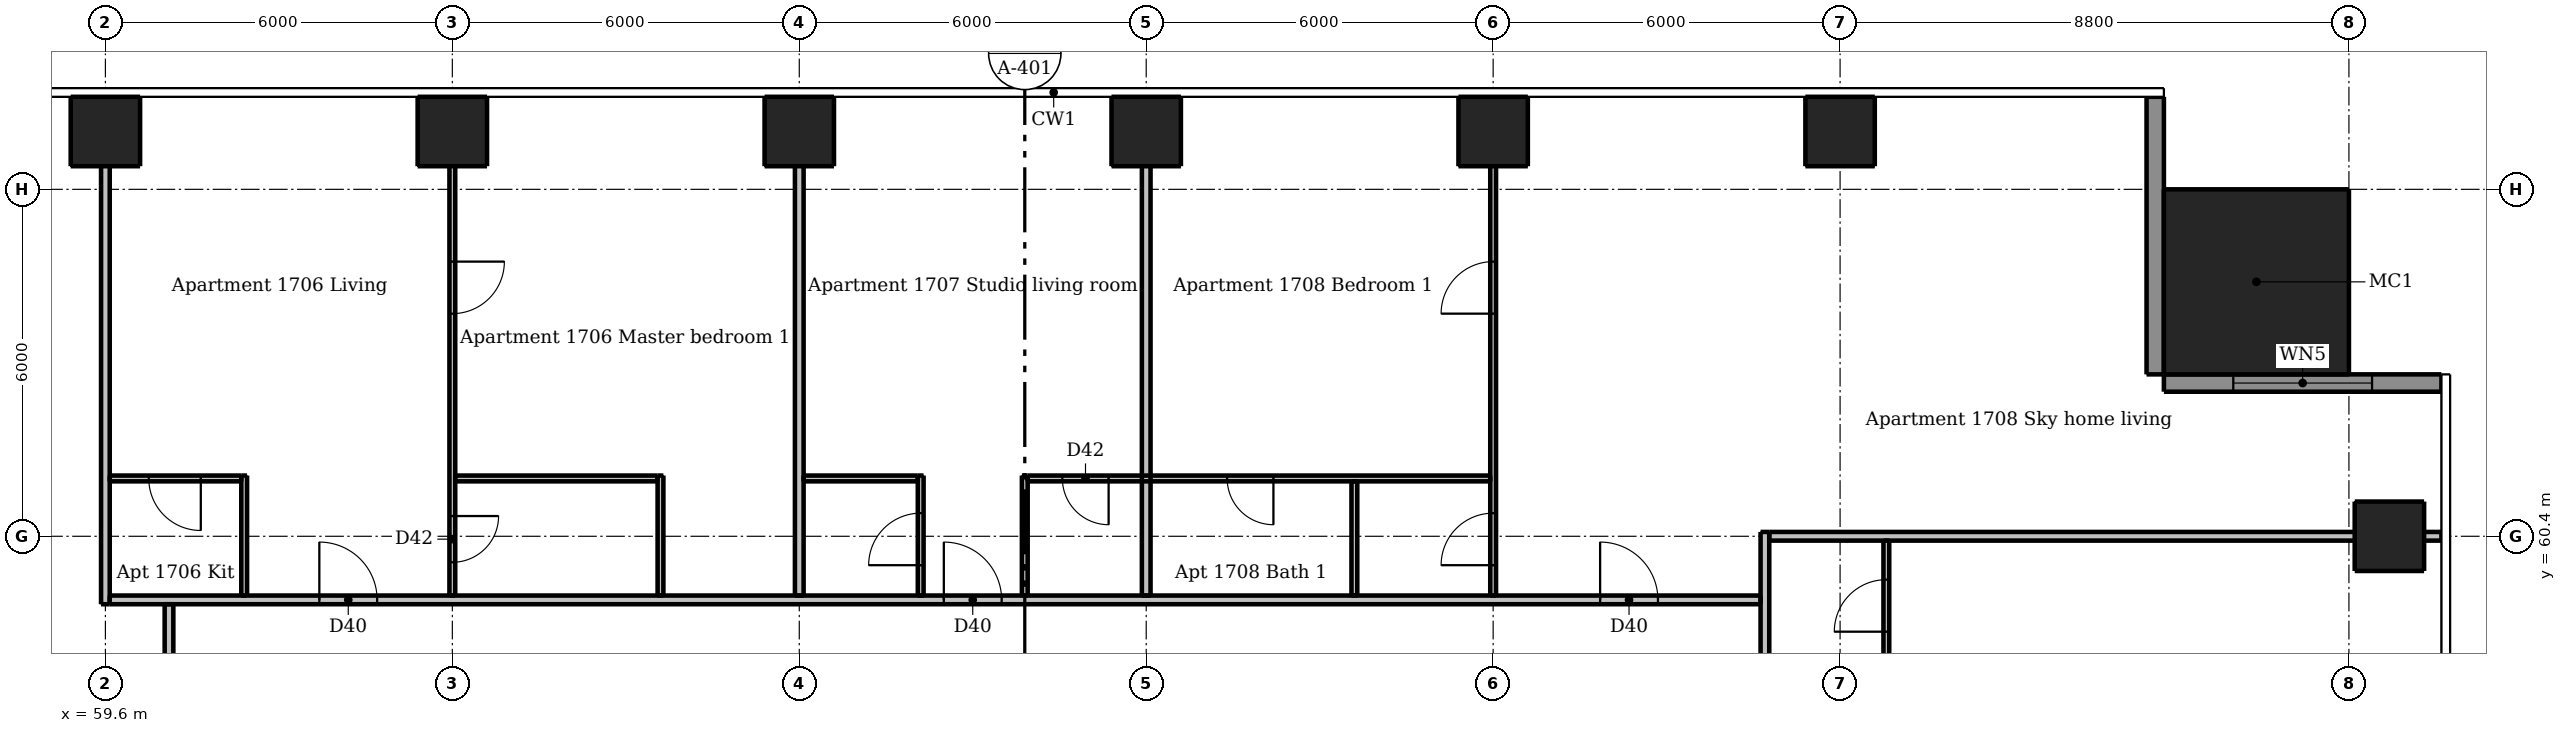
"""IFC4 building model, lengths in metres.
Left out: names, types, materials, properties, quantities, classifications, styles, units other than length and angle.
Written with IfcOpenShell. Run it as: python <this file> out.ifc"""

import sys

from ifc_helpers import new_model, si_unit, direction, frame, frame_2d, origin, origin_2d, place, context, subcontext, project, spatial, rectangle, extrude, element, fill, save


model = new_model("IFC4")
c1 = context("Model", 3, precision=1e-05, world=origin(), true_north=direction((0.0, 1.0)))
c2 = subcontext(c1, "Body", "Model", "MODEL_VIEW")
j1 = project(units=[si_unit("LENGTHUNIT", "METRE"), si_unit("PLANEANGLEUNIT", "RADIAN")], contexts=[c1])
p1 = place(None, origin())
s1 = spatial("IfcSite", under=j1, at=p1, CompositionType="ELEMENT")
p2 = place(p1, origin())
s2 = spatial("IfcBuilding", under=s1, at=p2, CompositionType="ELEMENT")
p3 = place(p2, frame((0.0, 0.0, 63.1)))
s3 = spatial("IfcBuildingStorey", under=s2, at=p3, CompositionType="ELEMENT", Elevation=63.1)
for number, where, z_axis, x_axis in (
    (1, (99.1, 60.4, 0.0), (0.0, 0.0, 1.0), (1.0, 0.0, 0.0)),
    (2, (59.6, 67.4, 0.0), (0.0, 0.0, 1.0), (1.0, 0.0, 0.0)),
    (3, (65.6, 67.4, 0.0), (0.0, 0.0, 1.0), (1.0, 0.0, 0.0)),
    (4, (71.6, 67.4, 0.0), (0.0, 0.0, 1.0), (1.0, 0.0, 0.0)),
    (5, (77.6, 67.4, 0.0), (0.0, 0.0, 1.0), (1.0, 0.0, 0.0)),
    (6, (83.6, 67.4, 0.0), (0.0, 0.0, 1.0), (1.0, 0.0, 0.0)),
    (7, (89.6, 67.4, 0.0), (0.0, 0.0, 1.0), (1.0, 0.0, 0.0)),
):
    element("IfcColumn", number, at=place(p3, frame(where, z_axis=z_axis, x_axis=x_axis)), inside=s3, PredefinedType="COLUMN", context=c2, shape_type="SweptSolid", body=[
        extrude(rectangle(XDim=1.2, YDim=1.2, at=origin_2d()), origin(), (0.0, 0.0, 1.0), 3.05),
    ])
p4 = place(p3, frame((96.8, 64.8, 0.0), z_axis=(0.0, 0.0, 1.0), x_axis=(1.0, 0.0, 0.0)))
e8 = element("IfcColumn", 8, at=p4, inside=s3, PredefinedType="COLUMN", context=c2, shape_type="SweptSolid", body=[
    extrude(rectangle(XDim=3.2, YDim=3.2, at=origin_2d()), origin(), (0.0, 0.0, 1.0), 3.3),
])
p5 = place(p3, frame((100.0, 63.05, 0.0), z_axis=(0.0, 0.0, 1.0), x_axis=(-1.0, 0.0, 0.0)))
e9 = element("IfcWall", 9, at=p5, inside=s3, PredefinedType="SOLIDWALL", context=c2, shape_type="SweptSolid", body=[
    extrude(rectangle(XDim=4.8, YDim=0.3, at=frame_2d((2.4, 0.0))), origin(), (0.0, 0.0, 1.0), 3.05),
])
p6 = place(p5, frame((1.2, 0.0, 0.15)))
e10 = element("IfcOpeningElement", 10, at=p6, cuts=e9, PredefinedType="OPENING", context=c2, shape_type="SweptSolid", body=[
    extrude(rectangle(XDim=2.4, YDim=2.1, at=frame_2d((1.2, 1.05))), frame((0.0, 0.16, 0.0), z_axis=(0.0, -1.0, 0.0), x_axis=(1.0, 0.0, 0.0)), (0.0, 0.0, 1.0), 0.32),
])
p7 = place(p3, frame((95.05, 63.2, 0.0), z_axis=(0.0, 0.0, 1.0), x_axis=(0.0, 1.0, 0.0)))
e11 = element("IfcWall", 11, at=p7, inside=s3, PredefinedType="SOLIDWALL", context=c2, shape_type="SweptSolid", body=[
    extrude(rectangle(XDim=4.8, YDim=0.3, at=frame_2d((2.4, 0.0))), origin(), (0.0, 0.0, 1.0), 3.05),
])
p8 = place(p3, frame((62.0, 59.375, 0.0), z_axis=(0.0, 0.0, 1.0), x_axis=(0.0, 1.0, 0.0)))
e12 = element("IfcWall", 12, at=p8, inside=s3, PredefinedType="PARTITIONING", context=c2, shape_type="SweptSolid", body=[
    extrude(rectangle(XDim=2.075, YDim=0.1, at=frame_2d((1.038, 0.0))), origin(), (0.0, 0.0, 1.0), 3.05),
])
p9 = place(p3, frame((65.6, 68.0, 0.0), z_axis=(0.0, 0.0, 1.0), x_axis=(0.0, -1.0, 0.0)))
e13 = element("IfcWall", 13, at=p9, inside=s3, PredefinedType="PARTITIONING", context=c2, shape_type="SweptSolid", body=[
    extrude(rectangle(XDim=8.625, YDim=0.1, at=frame_2d((4.312, 0.0))), origin(), (0.0, 0.0, 1.0), 2.516),
])
p10 = place(p9, frame((2.85, 0.0, 0.0)))
e14 = element("IfcOpeningElement", 14, at=p10, cuts=e13, PredefinedType="OPENING", context=c2, shape_type="SweptSolid", body=[
    extrude(rectangle(XDim=0.9, YDim=2.1, at=frame_2d((0.45, 1.05))), frame((0.0, 0.06, 0.0), z_axis=(0.0, -1.0, 0.0), x_axis=(1.0, 0.0, 0.0)), (0.0, 0.0, 1.0), 0.12),
])
p11 = place(p9, frame((7.25, 0.0, 0.0)))
e15 = element("IfcOpeningElement", 15, at=p11, cuts=e13, PredefinedType="OPENING", context=c2, shape_type="SweptSolid", body=[
    extrude(rectangle(XDim=0.8, YDim=2.1, at=frame_2d((0.4, 1.05))), frame((0.0, 0.06, 0.0), z_axis=(0.0, -1.0, 0.0), x_axis=(1.0, 0.0, 0.0)), (0.0, 0.0, 1.0), 0.12),
])
p12 = place(p3, frame((69.2, 59.375, 0.0), z_axis=(0.0, 0.0, 1.0), x_axis=(0.0, 1.0, 0.0)))
e16 = element("IfcWall", 16, at=p12, inside=s3, PredefinedType="PARTITIONING", context=c2, shape_type="SweptSolid", body=[
    extrude(rectangle(XDim=2.075, YDim=0.1, at=frame_2d((1.038, 0.0))), origin(), (0.0, 0.0, 1.0), 3.05),
])
p13 = place(p3, frame((73.7, 59.375, 0.0), z_axis=(0.0, 0.0, 1.0), x_axis=(0.0, 1.0, 0.0)))
e17 = element("IfcWall", 17, at=p13, inside=s3, PredefinedType="PARTITIONING", context=c2, shape_type="SweptSolid", body=[
    extrude(rectangle(XDim=2.075, YDim=0.1, at=frame_2d((1.038, 0.0))), origin(), (0.0, 0.0, 1.0), 3.05),
])
p14 = place(p13, frame((0.525, 0.0, 0.0)))
e18 = element("IfcOpeningElement", 18, at=p14, cuts=e17, PredefinedType="OPENING", context=c2, shape_type="SweptSolid", body=[
    extrude(rectangle(XDim=0.9, YDim=2.1, at=frame_2d((0.45, 1.05))), frame((0.0, 0.06, 0.0), z_axis=(0.0, -1.0, 0.0), x_axis=(1.0, 0.0, 0.0)), (0.0, 0.0, 1.0), 0.12),
])
p15 = place(p3, frame((75.5, 59.375, 0.0), z_axis=(0.0, 0.0, 1.0), x_axis=(0.0, 1.0, 0.0)))
e19 = element("IfcWall", 19, at=p15, inside=s3, PredefinedType="PARTITIONING", context=c2, shape_type="SweptSolid", body=[
    extrude(rectangle(XDim=2.075, YDim=0.1, at=frame_2d((1.038, 0.0))), origin(), (0.0, 0.0, 1.0), 3.05),
])
p16 = place(p3, frame((81.2, 59.375, 0.0), z_axis=(0.0, 0.0, 1.0), x_axis=(0.0, 1.0, 0.0)))
e20 = element("IfcWall", 20, at=p16, inside=s3, PredefinedType="PARTITIONING", context=c2, shape_type="SweptSolid", body=[
    extrude(rectangle(XDim=1.975, YDim=0.1, at=frame_2d((0.988, 0.0))), origin(), (0.0, 0.0, 1.0), 3.05),
])
p17 = place(p3, frame((83.6, 59.375, 0.0), z_axis=(0.0, 0.0, 1.0), x_axis=(0.0, 1.0, 0.0)))
e21 = element("IfcWall", 21, at=p17, inside=s3, PredefinedType="PARTITIONING", context=c2, shape_type="SweptSolid", body=[
    extrude(rectangle(XDim=8.625, YDim=0.1, at=frame_2d((4.312, 0.0))), origin(), (0.0, 0.0, 1.0), 2.516),
])
p18 = place(p17, frame((0.525, 0.0, 0.0)))
e22 = element("IfcOpeningElement", 22, at=p18, cuts=e21, PredefinedType="OPENING", context=c2, shape_type="SweptSolid", body=[
    extrude(rectangle(XDim=0.9, YDim=2.1, at=frame_2d((0.45, 1.05))), frame((0.0, 0.06, 0.0), z_axis=(0.0, -1.0, 0.0), x_axis=(1.0, 0.0, 0.0)), (0.0, 0.0, 1.0), 0.12),
])
p19 = place(p17, frame((4.875, 0.0, 0.0)))
e23 = element("IfcOpeningElement", 23, at=p19, cuts=e21, PredefinedType="OPENING", context=c2, shape_type="SweptSolid", body=[
    extrude(rectangle(XDim=0.9, YDim=2.1, at=frame_2d((0.45, 1.05))), frame((0.0, 0.06, 0.0), z_axis=(0.0, -1.0, 0.0), x_axis=(1.0, 0.0, 0.0)), (0.0, 0.0, 1.0), 0.12),
])
p20 = place(p3, frame((90.4, 57.95, 0.0), z_axis=(0.0, 0.0, 1.0), x_axis=(0.0, 1.0, 0.0)))
e24 = element("IfcWall", 24, at=p20, inside=s3, PredefinedType="PARTITIONING", context=c2, shape_type="SweptSolid", body=[
    extrude(rectangle(XDim=2.375, YDim=0.1, at=frame_2d((1.188, 0.0))), origin(), (0.0, 0.0, 1.0), 3.05),
])
p21 = place(p20, frame((0.8, 0.0, 0.0)))
e25 = element("IfcOpeningElement", 25, at=p21, cuts=e24, PredefinedType="OPENING", context=c2, shape_type="SweptSolid", body=[
    extrude(rectangle(XDim=0.9, YDim=2.1, at=frame_2d((0.45, 1.05))), frame((0.0, 0.06, 0.0), z_axis=(0.0, -1.0, 0.0), x_axis=(1.0, 0.0, 0.0)), (0.0, 0.0, 1.0), 0.12),
])
p22 = place(p3, frame((61.95, 61.4, 0.0), z_axis=(0.0, 0.0, 1.0), x_axis=(-1.0, 0.0, 0.0)))
e26 = element("IfcWall", 26, at=p22, inside=s3, PredefinedType="PARTITIONING", context=c2, shape_type="SweptSolid", body=[
    extrude(rectangle(XDim=2.275, YDim=0.1, at=frame_2d((1.137, 0.0))), origin(), (0.0, 0.0, 1.0), 3.05),
])
p23 = place(p22, frame((0.7, 0.0, 0.0)))
e27 = element("IfcOpeningElement", 27, at=p23, cuts=e26, PredefinedType="OPENING", context=c2, shape_type="SweptSolid", body=[
    extrude(rectangle(XDim=0.9, YDim=2.1, at=frame_2d((0.45, 1.05))), frame((0.0, 0.06, 0.0), z_axis=(0.0, -1.0, 0.0), x_axis=(1.0, 0.0, 0.0)), (0.0, 0.0, 1.0), 0.12),
])
p24 = place(p3, frame((65.65, 61.4, 0.0), z_axis=(0.0, 0.0, 1.0), x_axis=(1.0, 0.0, 0.0)))
e28 = element("IfcWall", 28, at=p24, inside=s3, PredefinedType="PARTITIONING", context=c2, shape_type="SweptSolid", body=[
    extrude(rectangle(XDim=3.5, YDim=0.1, at=frame_2d((1.75, 0.0))), origin(), (0.0, 0.0, 1.0), 3.05),
])
p25 = place(p3, frame((71.675, 61.4, 0.0), z_axis=(0.0, 0.0, 1.0), x_axis=(1.0, 0.0, 0.0)))
e29 = element("IfcWall", 29, at=p25, inside=s3, PredefinedType="PARTITIONING", context=c2, shape_type="SweptSolid", body=[
    extrude(rectangle(XDim=1.975, YDim=0.1, at=frame_2d((0.987, 0.0))), origin(), (0.0, 0.0, 1.0), 3.05),
])
p26 = place(p3, frame((83.55, 61.4, 0.0), z_axis=(0.0, 0.0, 1.0), x_axis=(-1.0, 0.0, 0.0)))
e30 = element("IfcWall", 30, at=p26, inside=s3, PredefinedType="PARTITIONING", context=c2, shape_type="SweptSolid", body=[
    extrude(rectangle(XDim=8.0, YDim=0.1, at=frame_2d((4.0, 0.0))), origin(), (0.0, 0.0, 1.0), 3.05),
])
p27 = place(p26, frame((6.6, 0.0, 0.0)))
e31 = element("IfcOpeningElement", 31, at=p27, cuts=e30, PredefinedType="OPENING", context=c2, shape_type="SweptSolid", body=[
    extrude(rectangle(XDim=0.8, YDim=2.1, at=frame_2d((0.4, 1.05))), frame((0.0, 0.06, 0.0), z_axis=(0.0, -1.0, 0.0), x_axis=(1.0, 0.0, 0.0)), (0.0, 0.0, 1.0), 0.12),
])
p28 = place(p26, frame((3.75, 0.0, 0.0)))
e32 = element("IfcOpeningElement", 32, at=p28, cuts=e30, PredefinedType="OPENING", context=c2, shape_type="SweptSolid", body=[
    extrude(rectangle(XDim=0.8, YDim=2.1, at=frame_2d((0.4, 1.05))), frame((0.0, 0.06, 0.0), z_axis=(0.0, -1.0, 0.0), x_axis=(1.0, 0.0, 0.0)), (0.0, 0.0, 1.0), 0.12),
])
p29 = place(p3, frame((59.6, 59.225, 0.0), z_axis=(0.0, 0.0, 1.0), x_axis=(0.0, 1.0, 0.0)))
e33 = element("IfcWall", 33, at=p29, inside=s3, PredefinedType="PARTITIONING", context=c2, shape_type="SweptSolid", body=[
    extrude(rectangle(XDim=8.775, YDim=0.15, at=frame_2d((4.387, 0.0))), origin(), (0.0, 0.0, 1.0), 2.51),
])
p30 = place(p3, frame((60.7, 30.325, 0.0), z_axis=(0.0, 0.0, 1.0), x_axis=(0.0, 1.0, 0.0)))
e34 = element("IfcWall", 34, at=p30, inside=s3, PredefinedType="PARTITIONING", context=c2, shape_type="SweptSolid", body=[
    extrude(rectangle(XDim=28.9, YDim=0.15, at=frame_2d((14.45, 0.0))), origin(), (0.0, 0.0, 1.0), 3.05),
])
p31 = place(p30, frame((7.375, 0.0, 0.0)))
e35 = element("IfcOpeningElement", 35, at=p31, cuts=e34, PredefinedType="OPENING", context=c2, shape_type="SweptSolid", body=[
    extrude(rectangle(XDim=1.0, YDim=2.1, at=frame_2d((0.5, 1.05))), frame((0.0, 0.085, 0.0), z_axis=(0.0, -1.0, 0.0), x_axis=(1.0, 0.0, 0.0)), (0.0, 0.0, 1.0), 0.17),
])
p32 = place(p30, frame((14.575, 0.0, 0.0)))
e36 = element("IfcOpeningElement", 36, at=p32, cuts=e34, PredefinedType="OPENING", context=c2, shape_type="SweptSolid", body=[
    extrude(rectangle(XDim=1.0, YDim=2.1, at=frame_2d((0.5, 1.05))), frame((0.0, 0.085, 0.0), z_axis=(0.0, -1.0, 0.0), x_axis=(1.0, 0.0, 0.0)), (0.0, 0.0, 1.0), 0.17),
])
p33 = place(p30, frame((26.025, 0.0, 0.0)))
e37 = element("IfcOpeningElement", 37, at=p33, cuts=e34, PredefinedType="OPENING", context=c2, shape_type="SweptSolid", body=[
    extrude(rectangle(XDim=1.0, YDim=2.1, at=frame_2d((0.5, 1.05))), frame((0.0, 0.085, 0.0), z_axis=(0.0, -1.0, 0.0), x_axis=(1.0, 0.0, 0.0)), (0.0, 0.0, 1.0), 0.17),
])
for number, where, z_axis, x_axis in (
    (38, (71.6, 59.375, 0.0), (0.0, 0.0, 1.0), (0.0, 1.0, 0.0)),
    (39, (77.6, 59.375, 0.0), (0.0, 0.0, 1.0), (0.0, 1.0, 0.0)),
):
    element("IfcWall", number, at=place(p3, frame(where, z_axis=z_axis, x_axis=x_axis)), inside=s3, PredefinedType="PARTITIONING", context=c2, shape_type="SweptSolid", body=[
        extrude(rectangle(XDim=8.625, YDim=0.15, at=frame_2d((4.312, 0.0))), origin(), (0.0, 0.0, 1.0), 2.516),
    ])
p34 = place(p3, frame((88.3, 60.475, 0.0), z_axis=(0.0, 0.0, 1.0), x_axis=(0.0, -1.0, 0.0)))
e40 = element("IfcWall", 40, at=p34, inside=s3, PredefinedType="PARTITIONING", context=c2, shape_type="SweptSolid", body=[
    extrude(rectangle(XDim=28.7, YDim=0.15, at=frame_2d((14.35, 0.0))), origin(), (0.0, 0.0, 1.0), 3.05),
])
p35 = place(p34, frame((27.425, 0.0, 0.0)))
e41 = element("IfcOpeningElement", 41, at=p35, cuts=e40, PredefinedType="OPENING", context=c2, shape_type="SweptSolid", body=[
    extrude(rectangle(XDim=1.0, YDim=2.1, at=frame_2d((0.5, 1.05))), frame((0.0, 0.085, 0.0), z_axis=(0.0, -1.0, 0.0), x_axis=(1.0, 0.0, 0.0)), (0.0, 0.0, 1.0), 0.17),
])
p36 = place(p34, frame((14.525, 0.0, 0.0)))
e42 = element("IfcOpeningElement", 42, at=p36, cuts=e40, PredefinedType="OPENING", context=c2, shape_type="SweptSolid", body=[
    extrude(rectangle(XDim=1.0, YDim=2.1, at=frame_2d((0.5, 1.05))), frame((0.0, 0.085, 0.0), z_axis=(0.0, -1.0, 0.0), x_axis=(1.0, 0.0, 0.0)), (0.0, 0.0, 1.0), 0.17),
])
p37 = place(p34, frame((3.775, 0.0, 0.0)))
e43 = element("IfcOpeningElement", 43, at=p37, cuts=e40, PredefinedType="OPENING", context=c2, shape_type="SweptSolid", body=[
    extrude(rectangle(XDim=1.0, YDim=2.1, at=frame_2d((0.5, 1.05))), frame((0.0, 0.085, 0.0), z_axis=(0.0, -1.0, 0.0), x_axis=(1.0, 0.0, 0.0)), (0.0, 0.0, 1.0), 0.17),
])
p38 = place(p3, frame((88.375, 60.4, 0.0), z_axis=(0.0, 0.0, 1.0), x_axis=(1.0, 0.0, 0.0)))
e44 = element("IfcWall", 44, at=p38, inside=s3, PredefinedType="PARTITIONING", context=c2, shape_type="SweptSolid", body=[
    extrude(rectangle(XDim=11.625, YDim=0.15, at=frame_2d((5.812, 0.0))), origin(), (0.0, 0.0, 1.0), 2.516),
])
p39 = place(p3, frame((59.675, 59.3, 0.0), z_axis=(0.0, 0.0, 1.0), x_axis=(1.0, 0.0, 0.0)))
e45 = element("IfcWall", 45, at=p39, inside=s3, PredefinedType="PARTITIONING", context=c2, shape_type="SweptSolid", body=[
    extrude(rectangle(XDim=28.55, YDim=0.15, at=frame_2d((14.275, 0.0))), origin(), (0.0, 0.0, 1.0), 3.05),
])
p40 = place(p39, frame((3.625, 0.0, 0.0)))
e46 = element("IfcOpeningElement", 46, at=p40, cuts=e45, PredefinedType="OPENING", context=c2, shape_type="SweptSolid", body=[
    extrude(rectangle(XDim=1.0, YDim=2.1, at=frame_2d((0.5, 1.05))), frame((0.0, 0.085, 0.0), z_axis=(0.0, -1.0, 0.0), x_axis=(1.0, 0.0, 0.0)), (0.0, 0.0, 1.0), 0.17),
])
p41 = place(p39, frame((14.425, 0.0, 0.0)))
e47 = element("IfcOpeningElement", 47, at=p41, cuts=e45, PredefinedType="OPENING", context=c2, shape_type="SweptSolid", body=[
    extrude(rectangle(XDim=1.0, YDim=2.1, at=frame_2d((0.5, 1.05))), frame((0.0, 0.085, 0.0), z_axis=(0.0, -1.0, 0.0), x_axis=(1.0, 0.0, 0.0)), (0.0, 0.0, 1.0), 0.17),
])
p42 = place(p39, frame((25.775, 0.0, 0.0)))
e48 = element("IfcOpeningElement", 48, at=p42, cuts=e45, PredefinedType="OPENING", context=c2, shape_type="SweptSolid", body=[
    extrude(rectangle(XDim=1.0, YDim=2.1, at=frame_2d((0.5, 1.05))), frame((0.0, 0.085, 0.0), z_axis=(0.0, -1.0, 0.0), x_axis=(1.0, 0.0, 0.0)), (0.0, 0.0, 1.0), 0.17),
])
p43 = place(p6, origin())
e49 = element("IfcWindow", 49, at=p43, inside=s3, PartitioningType="DOUBLE_PANEL_VERTICAL", PredefinedType="WINDOW", context=c2, shape_type="SweptSolid", body=[
    extrude(rectangle(XDim=2.4, YDim=2.1, at=frame_2d((1.2, 1.05))), frame((0.0, 0.03, 0.0), z_axis=(0.0, -1.0, 0.0), x_axis=(1.0, 0.0, 0.0)), (0.0, 0.0, 1.0), 0.06),
])
fill(e10, e49)
p44 = place(p21, origin())
e50 = element("IfcDoor", 50, at=p44, inside=s3, OperationType="SINGLE_SWING_LEFT", PredefinedType="DOOR", context=c2, shape_type="SweptSolid", body=[
    extrude(rectangle(XDim=0.9, YDim=2.1, at=frame_2d((0.45, 1.05))), frame((0.0, 0.025, 0.0), z_axis=(0.0, -1.0, 0.0), x_axis=(1.0, 0.0, 0.0)), (0.0, 0.0, 1.0), 0.05),
])
fill(e25, e50)
p45 = place(p40, origin())
e51 = element("IfcDoor", 51, at=p45, inside=s3, OperationType="SINGLE_SWING_LEFT", PredefinedType="DOOR", context=c2, shape_type="SweptSolid", body=[
    extrude(rectangle(XDim=1.0, YDim=2.1, at=frame_2d((0.5, 1.05))), frame((0.0, 0.025, 0.0), z_axis=(0.0, -1.0, 0.0), x_axis=(1.0, 0.0, 0.0)), (0.0, 0.0, 1.0), 0.05),
])
fill(e46, e51)
p46 = place(p23, origin())
e52 = element("IfcDoor", 52, at=p46, inside=s3, OperationType="SINGLE_SWING_LEFT", PredefinedType="DOOR", context=c2, shape_type="SweptSolid", body=[
    extrude(rectangle(XDim=0.9, YDim=2.1, at=frame_2d((0.45, 1.05))), frame((0.0, 0.025, 0.0), z_axis=(0.0, -1.0, 0.0), x_axis=(1.0, 0.0, 0.0)), (0.0, 0.0, 1.0), 0.05),
])
fill(e27, e52)
p47 = place(p10, origin())
e53 = element("IfcDoor", 53, at=p47, inside=s3, OperationType="SINGLE_SWING_LEFT", PredefinedType="DOOR", context=c2, shape_type="SweptSolid", body=[
    extrude(rectangle(XDim=0.9, YDim=2.1, at=frame_2d((0.45, 1.05))), frame((0.0, 0.025, 0.0), z_axis=(0.0, -1.0, 0.0), x_axis=(1.0, 0.0, 0.0)), (0.0, 0.0, 1.0), 0.05),
])
fill(e14, e53)
p48 = place(p11, origin())
e54 = element("IfcDoor", 54, at=p48, inside=s3, OperationType="SINGLE_SWING_LEFT", PredefinedType="DOOR", context=c2, shape_type="SweptSolid", body=[
    extrude(rectangle(XDim=0.8, YDim=2.1, at=frame_2d((0.4, 1.05))), frame((0.0, 0.025, 0.0), z_axis=(0.0, -1.0, 0.0), x_axis=(1.0, 0.0, 0.0)), (0.0, 0.0, 1.0), 0.05),
])
fill(e15, e54)
p49 = place(p41, origin())
e55 = element("IfcDoor", 55, at=p49, inside=s3, OperationType="SINGLE_SWING_LEFT", PredefinedType="DOOR", context=c2, shape_type="SweptSolid", body=[
    extrude(rectangle(XDim=1.0, YDim=2.1, at=frame_2d((0.5, 1.05))), frame((0.0, 0.025, 0.0), z_axis=(0.0, -1.0, 0.0), x_axis=(1.0, 0.0, 0.0)), (0.0, 0.0, 1.0), 0.05),
])
fill(e47, e55)
p50 = place(p14, origin())
e56 = element("IfcDoor", 56, at=p50, inside=s3, OperationType="SINGLE_SWING_LEFT", PredefinedType="DOOR", context=c2, shape_type="SweptSolid", body=[
    extrude(rectangle(XDim=0.9, YDim=2.1, at=frame_2d((0.45, 1.05))), frame((0.0, 0.025, 0.0), z_axis=(0.0, -1.0, 0.0), x_axis=(1.0, 0.0, 0.0)), (0.0, 0.0, 1.0), 0.05),
])
fill(e18, e56)
p51 = place(p27, origin())
e57 = element("IfcDoor", 57, at=p51, inside=s3, OperationType="SINGLE_SWING_LEFT", PredefinedType="DOOR", context=c2, shape_type="SweptSolid", body=[
    extrude(rectangle(XDim=0.8, YDim=2.1, at=frame_2d((0.4, 1.05))), frame((0.0, 0.025, 0.0), z_axis=(0.0, -1.0, 0.0), x_axis=(1.0, 0.0, 0.0)), (0.0, 0.0, 1.0), 0.05),
])
fill(e31, e57)
p52 = place(p42, origin())
e58 = element("IfcDoor", 58, at=p52, inside=s3, OperationType="SINGLE_SWING_LEFT", PredefinedType="DOOR", context=c2, shape_type="SweptSolid", body=[
    extrude(rectangle(XDim=1.0, YDim=2.1, at=frame_2d((0.5, 1.05))), frame((0.0, 0.025, 0.0), z_axis=(0.0, -1.0, 0.0), x_axis=(1.0, 0.0, 0.0)), (0.0, 0.0, 1.0), 0.05),
])
fill(e48, e58)
p53 = place(p18, origin())
e59 = element("IfcDoor", 59, at=p53, inside=s3, OperationType="SINGLE_SWING_LEFT", PredefinedType="DOOR", context=c2, shape_type="SweptSolid", body=[
    extrude(rectangle(XDim=0.9, YDim=2.1, at=frame_2d((0.45, 1.05))), frame((0.0, 0.025, 0.0), z_axis=(0.0, -1.0, 0.0), x_axis=(1.0, 0.0, 0.0)), (0.0, 0.0, 1.0), 0.05),
])
fill(e22, e59)
p54 = place(p19, origin())
e60 = element("IfcDoor", 60, at=p54, inside=s3, OperationType="SINGLE_SWING_LEFT", PredefinedType="DOOR", context=c2, shape_type="SweptSolid", body=[
    extrude(rectangle(XDim=0.9, YDim=2.1, at=frame_2d((0.45, 1.05))), frame((0.0, 0.025, 0.0), z_axis=(0.0, -1.0, 0.0), x_axis=(1.0, 0.0, 0.0)), (0.0, 0.0, 1.0), 0.05),
])
fill(e23, e60)
p55 = place(p28, origin())
e61 = element("IfcDoor", 61, at=p55, inside=s3, OperationType="SINGLE_SWING_LEFT", PredefinedType="DOOR", context=c2, shape_type="SweptSolid", body=[
    extrude(rectangle(XDim=0.8, YDim=2.1, at=frame_2d((0.4, 1.05))), frame((0.0, 0.025, 0.0), z_axis=(0.0, -1.0, 0.0), x_axis=(1.0, 0.0, 0.0)), (0.0, 0.0, 1.0), 0.05),
])
fill(e32, e61)
save(model, sys.argv[1])
